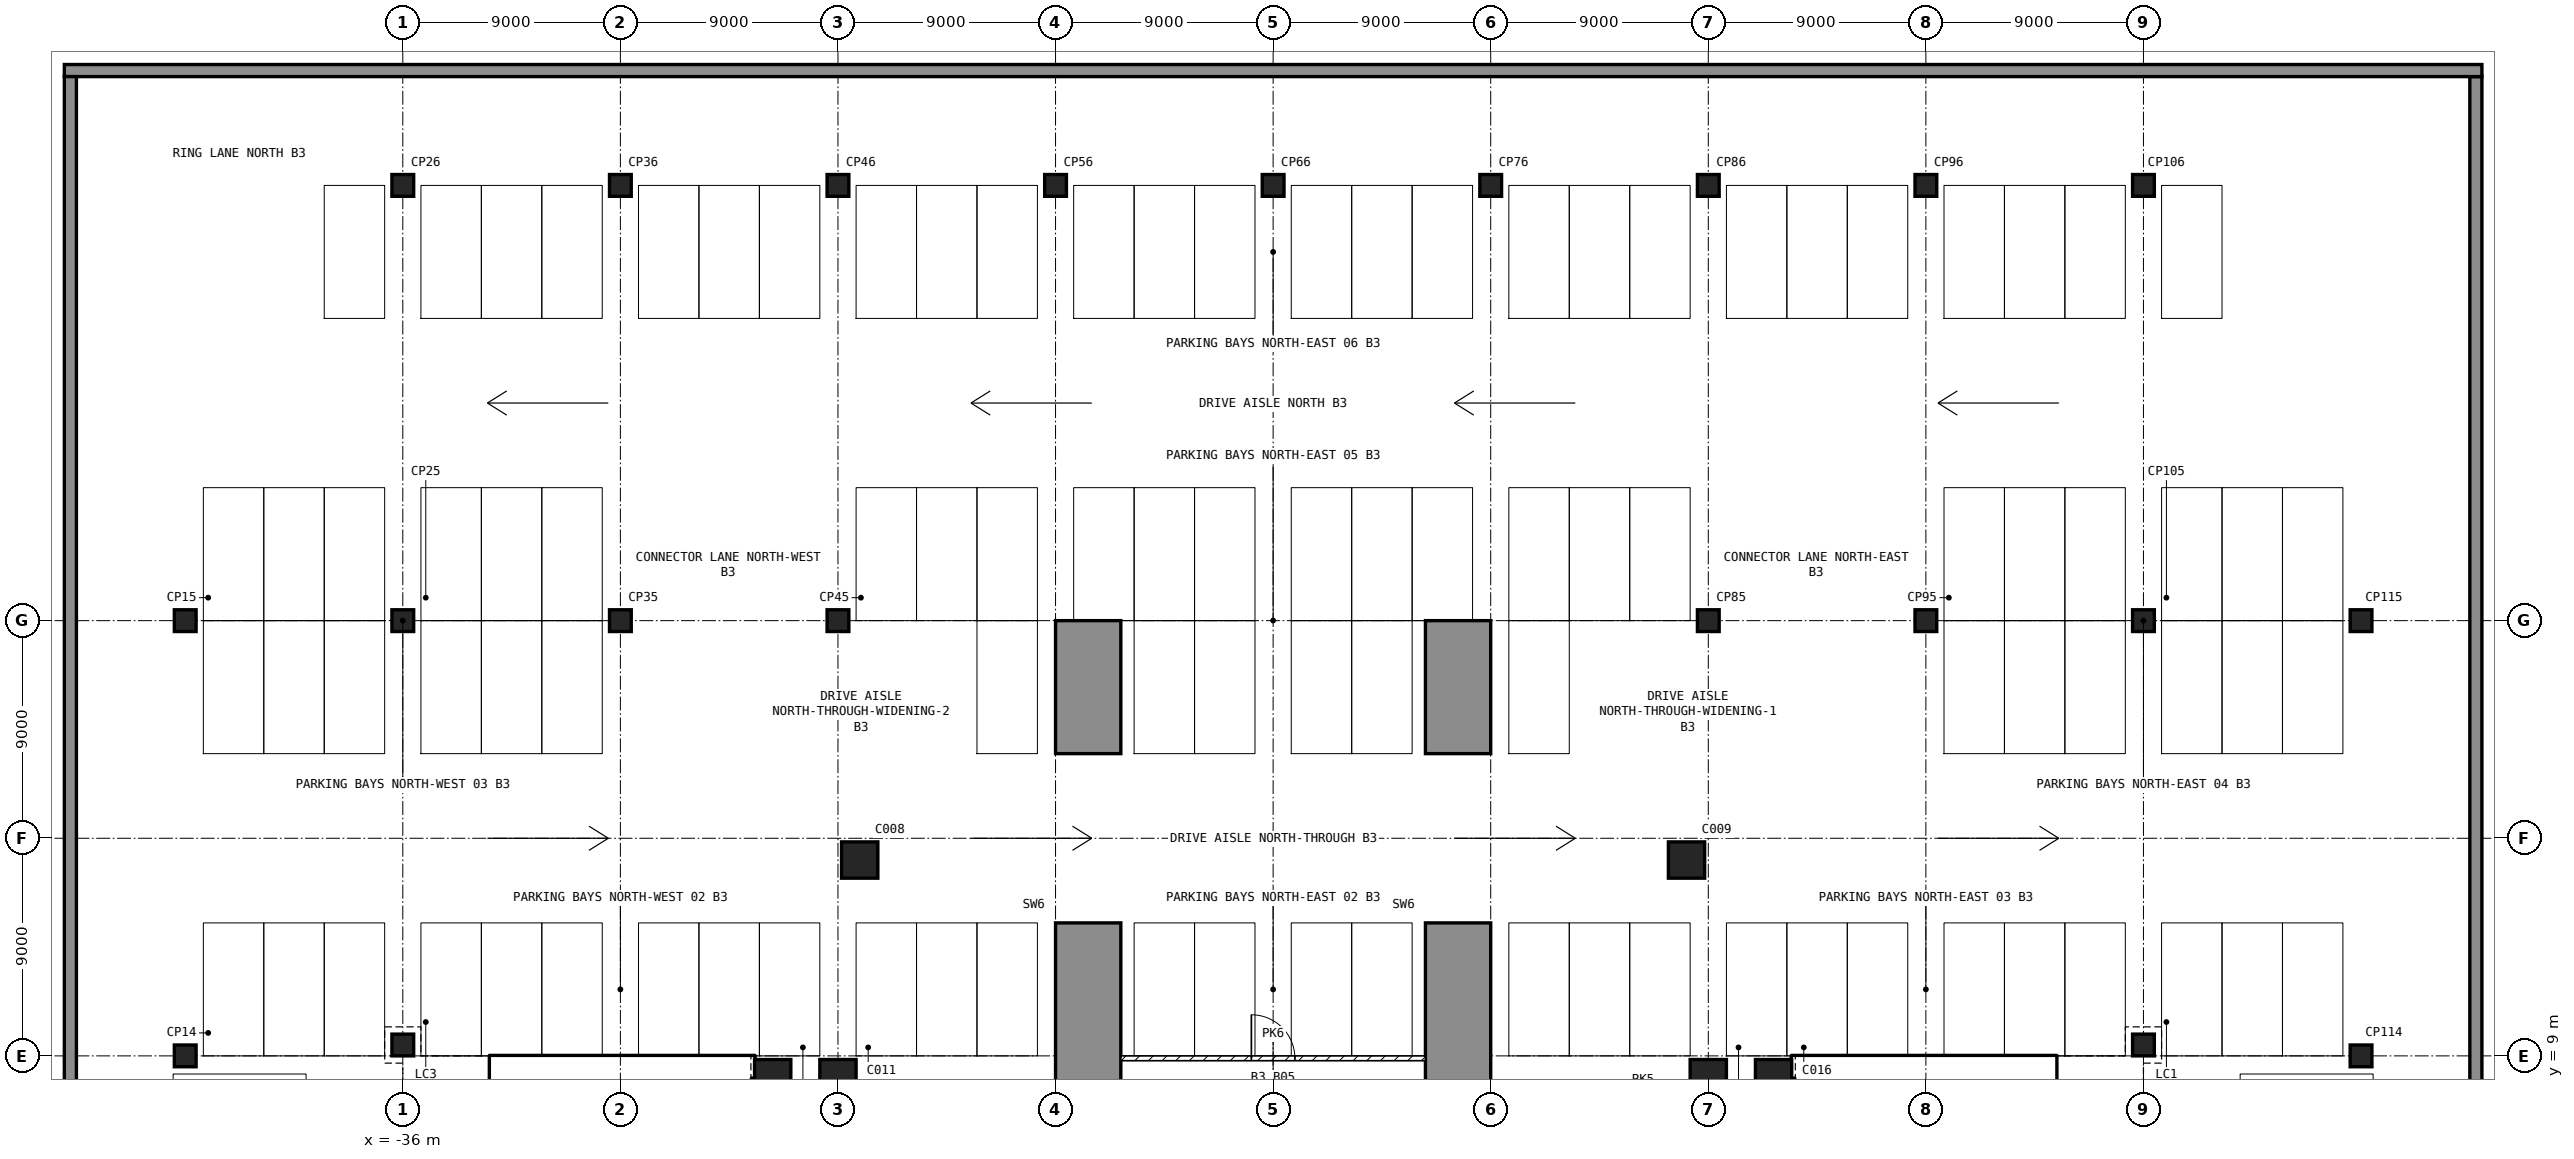
"""IFC4 building model, lengths in metres.
Left out: names, types, materials, properties, quantities, classifications, styles, units other than length and angle.
Written with IfcOpenShell. Run it as: python <this file> out.ifc"""

import sys

from ifc_helpers import new_model, si_unit, direction, frame, frame_2d, origin, origin_2d, place, context, subcontext, project, spatial, polyline, rectangle, outline, extrude, element, fill, save


model = new_model("IFC4")
c1 = context("Model", 3, precision=1e-05, world=origin(), true_north=direction((0.0, 1.0)))
c2 = subcontext(c1, "Body", "Model", "MODEL_VIEW")
j1 = project(units=[si_unit("LENGTHUNIT", "METRE"), si_unit("PLANEANGLEUNIT", "RADIAN")], contexts=[c1])
p1 = place(None, origin())
s1 = spatial("IfcSite", under=j1, at=p1, CompositionType="ELEMENT")
p2 = place(p1, origin())
s2 = spatial("IfcBuilding", under=s1, at=p2, CompositionType="ELEMENT")
p3 = place(p2, frame((0.0, 0.0, -12.9)))
s3 = spatial("IfcBuildingStorey", under=s2, at=p3, CompositionType="ELEMENT", Elevation=-12.9)
p4 = place(p3, frame((-50.0, 49.75, -0.3), z_axis=(0.0, 0.0, 1.0), x_axis=(1.0, 0.0, 0.0)))
e1 = element("IfcWall", 1, at=p4, inside=s3, PredefinedType="SOLIDWALL", context=c2, shape_type="SweptSolid", body=[
    extrude(rectangle(XDim=100.0, YDim=0.5, at=frame_2d((50.0, 0.0))), origin(), (0.0, 0.0, 1.0), 4.2),
])
for number, where, z_axis, x_axis in (
    (2, (49.75, -49.5, -0.3), (0.0, 0.0, 1.0), (0.0, 1.0, 0.0)),
    (3, (-49.75, -49.5, -0.3), (0.0, 0.0, 1.0), (0.0, 1.0, 0.0)),
):
    element("IfcWall", number, at=place(p3, frame(where, z_axis=z_axis, x_axis=x_axis)), inside=s3, PredefinedType="SOLIDWALL", context=c2, shape_type="SweptSolid", body=[
        extrude(rectangle(XDim=99.0, YDim=0.5, at=frame_2d((49.5, 0.0))), origin(), (0.0, 0.0, 1.0), 4.2),
    ])
for number, where, z_axis, x_axis in (
    (4, (-20.7, 8.1, -0.3), (0.0, 0.0, 1.0), (1.0, 0.0, 0.0)),
    (5, (-18.0, 8.1, -0.3), (0.0, 0.0, 1.0), (1.0, 0.0, 0.0)),
    (6, (18.0, 8.1, -0.3), (0.0, 0.0, 1.0), (1.0, 0.0, 0.0)),
    (7, (20.7, 8.1, -0.3), (0.0, 0.0, 1.0), (1.0, 0.0, 0.0)),
    (8, (17.1, 17.1, -0.3), (0.0, 0.0, 1.0), (1.0, 0.0, 0.0)),
    (9, (-17.1, 17.1, -0.3), (0.0, 0.0, 1.0), (1.0, 0.0, 0.0)),
):
    element("IfcColumn", number, at=place(p3, frame(where, z_axis=z_axis, x_axis=x_axis)), inside=s3, PredefinedType="COLUMN", context=c2, shape_type="SweptSolid", body=[
        extrude(rectangle(XDim=1.5, YDim=1.5, at=origin_2d()), origin(), (0.0, 0.0, 1.0), 4.2),
    ])
for number, where, z_axis, x_axis in (
    (10, (-45.0, 9.0, -0.3), (0.0, 0.0, 1.0), (1.0, 0.0, 0.0)),
    (11, (-45.0, 27.0, -0.3), (0.0, 0.0, 1.0), (1.0, 0.0, 0.0)),
    (12, (-36.0, 27.0, -0.3), (0.0, 0.0, 1.0), (1.0, 0.0, 0.0)),
    (13, (-36.0, 45.0, -0.3), (0.0, 0.0, 1.0), (1.0, 0.0, 0.0)),
    (14, (-27.0, 27.0, -0.3), (0.0, 0.0, 1.0), (1.0, 0.0, 0.0)),
    (15, (-27.0, 45.0, -0.3), (0.0, 0.0, 1.0), (1.0, 0.0, 0.0)),
    (16, (-18.0, 27.0, -0.3), (0.0, 0.0, 1.0), (1.0, 0.0, 0.0)),
    (17, (-18.0, 45.0, -0.3), (0.0, 0.0, 1.0), (1.0, 0.0, 0.0)),
    (18, (-9.0, 45.0, -0.3), (0.0, 0.0, 1.0), (1.0, 0.0, 0.0)),
    (19, (0.0, 45.0, -0.3), (0.0, 0.0, 1.0), (1.0, 0.0, 0.0)),
    (20, (9.0, 45.0, -0.3), (0.0, 0.0, 1.0), (1.0, 0.0, 0.0)),
    (21, (18.0, 27.0, -0.3), (0.0, 0.0, 1.0), (1.0, 0.0, 0.0)),
    (22, (18.0, 45.0, -0.3), (0.0, 0.0, 1.0), (1.0, 0.0, 0.0)),
    (23, (27.0, 27.0, -0.3), (0.0, 0.0, 1.0), (1.0, 0.0, 0.0)),
    (24, (27.0, 45.0, -0.3), (0.0, 0.0, 1.0), (1.0, 0.0, 0.0)),
    (25, (36.0, 27.0, -0.3), (0.0, 0.0, 1.0), (1.0, 0.0, 0.0)),
    (26, (36.0, 45.0, -0.3), (0.0, 0.0, 1.0), (1.0, 0.0, 0.0)),
    (27, (45.0, 9.0, -0.3), (0.0, 0.0, 1.0), (1.0, 0.0, 0.0)),
    (28, (45.0, 27.0, -0.3), (0.0, 0.0, 1.0), (1.0, 0.0, 0.0)),
    (29, (36.0, 9.45, -0.3), (0.0, 0.0, 1.0), (1.0, 0.0, 0.0)),
    (30, (-36.0, 9.45, -0.3), (0.0, 0.0, 1.0), (1.0, 0.0, 0.0)),
):
    element("IfcColumn", number, at=place(p3, frame(where, z_axis=z_axis, x_axis=x_axis)), inside=s3, PredefinedType="COLUMN", context=c2, shape_type="SweptSolid", body=[
        extrude(rectangle(XDim=0.9, YDim=0.9, at=origin_2d()), origin(), (0.0, 0.0, 1.0), 4.2),
    ])
for number, where, z_axis, x_axis in (
    (31, (6.3, 3.5, -0.3), (1.0, 0.0, 0.0), (0.0, 1.0, 0.0)),
    (32, (-9.0, 3.5, -0.3), (1.0, 0.0, 0.0), (0.0, 1.0, 0.0)),
):
    element("IfcWall", number, at=place(p3, frame(where, z_axis=z_axis, x_axis=x_axis)), inside=s3, PredefinedType="SOLIDWALL", context=c2, shape_type="SweptSolid", body=[
        extrude(outline(polyline([(0.0, 0.0), (11.0, 0.0), (11.0, 3.3), (18.0, 3.3), (18.0, 0.0), (23.5, 0.0), (23.5, 4.2), (0.0, 4.2), (0.0, 0.0)])), origin(), (0.0, 0.0, 1.0), 2.7),
    ])
p5 = place(p3, frame((31.95, 7.2, 0.0), z_axis=(0.0, 0.0, 1.0), x_axis=(0.0, 1.0, 0.0)))
e33 = element("IfcWall", 33, at=p5, inside=s3, PredefinedType="SHEAR", context=c2, shape_type="SweptSolid", body=[
    extrude(rectangle(XDim=1.8, YDim=0.9, at=frame_2d((0.9, 0.0))), origin(), (0.0, 0.0, 1.0), 3.9),
])
p6 = place(p3, frame((21.45, 8.55, 0.0), z_axis=(0.0, 0.0, 1.0), x_axis=(1.0, 0.0, 0.0)))
e34 = element("IfcWall", 34, at=p6, inside=s3, PredefinedType="SHEAR", context=c2, shape_type="SweptSolid", body=[
    extrude(rectangle(XDim=10.05, YDim=0.9, at=frame_2d((5.025, 0.0))), origin(), (0.0, 0.0, 1.0), 3.9),
])
p7 = place(p3, frame((21.825, 1.2, 0.0), z_axis=(0.0, 0.0, 1.0), x_axis=(0.0, 1.0, 0.0)))
e35 = element("IfcWall", 35, at=p7, inside=s3, PredefinedType="SHEAR", context=c2, shape_type="SweptSolid", body=[
    extrude(rectangle(XDim=6.9, YDim=0.45, at=frame_2d((3.45, 0.0))), origin(), (0.0, 0.0, 1.0), 3.9),
])
p8 = place(p3, frame((28.25, 5.25, 0.0), z_axis=(0.0, 0.0, 1.0), x_axis=(0.0, 1.0, 0.0)))
e36 = element("IfcWall", 36, at=p8, inside=s3, PredefinedType="SOLIDWALL", context=c2, shape_type="SweptSolid", body=[
    extrude(rectangle(XDim=2.85, YDim=0.2, at=frame_2d((1.425, 0.0))), origin(), (0.0, 0.0, 1.0), 3.9),
])
p9 = place(p3, frame((-31.95, 7.2, 0.0), z_axis=(0.0, 0.0, 1.0), x_axis=(0.0, 1.0, 0.0)))
e37 = element("IfcWall", 37, at=p9, inside=s3, PredefinedType="SHEAR", context=c2, shape_type="SweptSolid", body=[
    extrude(rectangle(XDim=1.8, YDim=0.9, at=frame_2d((0.9, 0.0))), origin(), (0.0, 0.0, 1.0), 3.9),
])
p10 = place(p3, frame((-31.5, 8.55, 0.0), z_axis=(0.0, 0.0, 1.0), x_axis=(1.0, 0.0, 0.0)))
e38 = element("IfcWall", 38, at=p10, inside=s3, PredefinedType="SHEAR", context=c2, shape_type="SweptSolid", body=[
    extrude(rectangle(XDim=10.05, YDim=0.9, at=frame_2d((5.025, 0.0))), origin(), (0.0, 0.0, 1.0), 3.9),
])
p11 = place(p3, frame((-21.825, 1.2, 0.0), z_axis=(0.0, 0.0, 1.0), x_axis=(0.0, 1.0, 0.0)))
e39 = element("IfcWall", 39, at=p11, inside=s3, PredefinedType="SHEAR", context=c2, shape_type="SweptSolid", body=[
    extrude(rectangle(XDim=6.9, YDim=0.45, at=frame_2d((3.45, 0.0))), origin(), (0.0, 0.0, 1.0), 3.9),
])
p12 = place(p3, frame((-28.25, 5.25, 0.0), z_axis=(0.0, 0.0, 1.0), x_axis=(0.0, 1.0, 0.0)))
e40 = element("IfcWall", 40, at=p12, inside=s3, PredefinedType="SOLIDWALL", context=c2, shape_type="SweptSolid", body=[
    extrude(rectangle(XDim=2.85, YDim=0.2, at=frame_2d((1.425, 0.0))), origin(), (0.0, 0.0, 1.0), 3.9),
])
p13 = place(p3, frame((-6.3, 8.9, 0.0), z_axis=(0.0, 0.0, 1.0), x_axis=(1.0, 0.0, 0.0)))
e41 = element("IfcWall", 41, at=p13, inside=s3, PredefinedType="PARTITIONING", context=c2, shape_type="SweptSolid", body=[
    extrude(rectangle(XDim=12.6, YDim=0.2, at=frame_2d((6.3, 0.0))), origin(), (0.0, 0.0, 1.0), 3.9),
])
p14 = place(p13, frame((5.4, 0.0, 0.0)))
e42 = element("IfcOpeningElement", 42, at=p14, cuts=e41, PredefinedType="OPENING", context=c2, shape_type="SweptSolid", body=[
    extrude(rectangle(XDim=1.8, YDim=2.1, at=frame_2d((0.9, 1.05))), frame((0.0, 0.11, 0.0), z_axis=(0.0, -1.0, 0.0), x_axis=(1.0, 0.0, 0.0)), (0.0, 0.0, 1.0), 0.22),
])
p15 = place(p14, origin())
e43 = element("IfcDoor", 43, at=p15, inside=s3, OperationType="SINGLE_SWING_LEFT", PredefinedType="DOOR", context=c2, shape_type="SweptSolid", body=[
    extrude(rectangle(XDim=1.8, YDim=2.1, at=frame_2d((0.9, 1.05))), frame((0.0, 0.025, 0.0), z_axis=(0.0, -1.0, 0.0), x_axis=(1.0, 0.0, 0.0)), (0.0, 0.0, 1.0), 0.05),
])
fill(e42, e43)
save(model, sys.argv[1])
